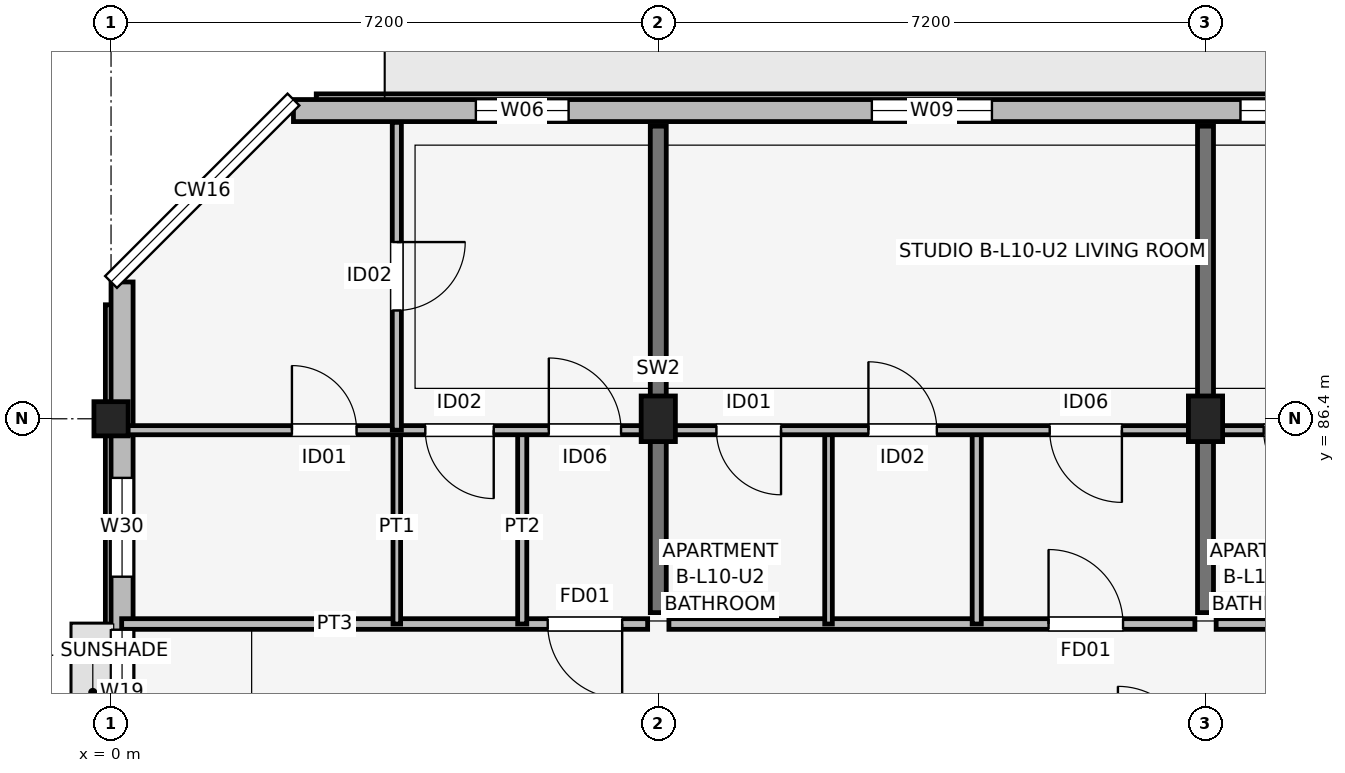
"""IFC4 building model, lengths in metres.
Left out: names, types, materials, properties, quantities, classifications, styles, units other than length and angle.
Written with IfcOpenShell. Run it as: python <this file> out.ifc"""

import sys

from ifc_helpers import new_model, si_unit, direction, frame, frame_2d, origin, origin_2d, place, context, subcontext, project, spatial, rectangle, extrude, element, fill, save


model = new_model("IFC4")
c1 = context("Model", 3, precision=1e-05, world=origin(), true_north=direction((0.0, 1.0)))
c2 = subcontext(c1, "Body", "Model", "MODEL_VIEW")
j1 = project(units=[si_unit("LENGTHUNIT", "METRE"), si_unit("PLANEANGLEUNIT", "RADIAN")], contexts=[c1])
p1 = place(None, origin())
s1 = spatial("IfcSite", under=j1, at=p1, CompositionType="ELEMENT")
p2 = place(p1, origin())
s2 = spatial("IfcBuilding", under=s1, at=p2, CompositionType="ELEMENT")
p3 = place(p2, frame((0.0, 0.0, 33.9)))
s3 = spatial("IfcBuildingStorey", under=s2, at=p3, CompositionType="ELEMENT", Elevation=33.9)
p4 = place(p3, frame((0.0, 86.4, 0.0), z_axis=(0.0, 0.0, 1.0), x_axis=(1.0, 0.0, 0.0)))
e1 = element("IfcColumn", 1, at=p4, inside=s3, PredefinedType="COLUMN", context=c2, shape_type="SweptSolid", body=[
    extrude(rectangle(XDim=0.45, YDim=0.45, at=origin_2d()), origin(), (0.0, 0.0, 1.0), 3.15),
])
for number, where, z_axis, x_axis in (
    (2, (7.2, 86.4, 0.0), (0.0, 0.0, 1.0), (1.0, 0.0, 0.0)),
    (3, (14.4, 86.4, 0.0), (0.0, 0.0, 1.0), (1.0, 0.0, 0.0)),
):
    element("IfcColumn", number, at=place(p3, frame(where, z_axis=z_axis, x_axis=x_axis)), inside=s3, PredefinedType="COLUMN", context=c2, shape_type="SweptSolid", body=[
        extrude(rectangle(XDim=0.45, YDim=0.6, at=origin_2d()), origin(), (0.0, 0.0, 1.0), 3.15),
    ])
for number, where, z_axis, x_axis in (
    (4, (7.2, 83.85, 0.0), (0.0, 0.0, 1.0), (0.0, 1.0, 0.0)),
    (5, (14.4, 83.85, 0.0), (0.0, 0.0, 1.0), (0.0, 1.0, 0.0)),
):
    element("IfcWall", number, at=place(p3, frame(where, z_axis=z_axis, x_axis=x_axis)), inside=s3, PredefinedType="SHEAR", context=c2, shape_type="SweptSolid", body=[
        extrude(rectangle(XDim=6.4, YDim=0.21, at=frame_2d((3.2, 0.0))), origin(), (0.0, 0.0, 1.0), 3.15),
    ])
p5 = place(p3, frame((33.6, 90.455, 0.0), z_axis=(0.0, 0.0, 1.0), x_axis=(-1.0, 0.0, 0.0)))
e6 = element("IfcWall", 6, at=p5, inside=s3, PredefinedType="SOLIDWALL", context=c2, shape_type="SweptSolid", body=[
    extrude(rectangle(XDim=31.2, YDim=0.29, at=frame_2d((15.6, 0.0))), origin(), (0.0, 0.0, 1.0), 2.48),
])
p6 = place(p5, frame((14.95, 0.0, 0.0), z_axis=(0.0, 0.0, 1.0), x_axis=(-1.0, 0.0, 0.0)))
e7 = element("IfcOpeningElement", 7, at=p6, cuts=e6, PredefinedType="OPENING", context=c2, shape_type="SweptSolid", body=[
    extrude(rectangle(XDim=1.9, YDim=2.2, at=frame_2d((0.95, 1.1))), frame((0.0, 0.155, 0.0), z_axis=(0.0, -1.0, 0.0), x_axis=(1.0, 0.0, 0.0)), (0.0, 0.0, 1.0), 0.31),
])
p7 = place(p5, frame((27.58, 0.0, 0.75)))
e8 = element("IfcOpeningElement", 8, at=p7, cuts=e6, PredefinedType="OPENING", context=c2, shape_type="SweptSolid", body=[
    extrude(rectangle(XDim=1.22, YDim=1.5, at=frame_2d((0.61, 0.75))), frame((0.0, 0.155, 0.0), z_axis=(0.0, -1.0, 0.0), x_axis=(1.0, 0.0, 0.0)), (0.0, 0.0, 1.0), 0.31),
])
p8 = place(p5, frame((22.01, 0.0, 0.7)))
e9 = element("IfcOpeningElement", 9, at=p8, cuts=e6, PredefinedType="OPENING", context=c2, shape_type="SweptSolid", body=[
    extrude(rectangle(XDim=1.58, YDim=1.6, at=frame_2d((0.79, 0.8))), frame((0.0, 0.155, 0.0), z_axis=(0.0, -1.0, 0.0), x_axis=(1.0, 0.0, 0.0)), (0.0, 0.0, 1.0), 0.31),
])
p9 = place(p5, frame((17.28, 0.0, 0.75)))
e10 = element("IfcOpeningElement", 10, at=p9, cuts=e6, PredefinedType="OPENING", context=c2, shape_type="SweptSolid", body=[
    extrude(rectangle(XDim=1.46, YDim=1.55, at=frame_2d((0.73, 0.775))), frame((0.0, 0.155, 0.0), z_axis=(0.0, -1.0, 0.0), x_axis=(1.0, 0.0, 0.0)), (0.0, 0.0, 1.0), 0.31),
])
p10 = place(p5, frame((7.47, 0.0, 0.7)))
e11 = element("IfcOpeningElement", 11, at=p10, cuts=e6, PredefinedType="OPENING", context=c2, shape_type="SweptSolid", body=[
    extrude(rectangle(XDim=1.86, YDim=1.6, at=frame_2d((0.93, 0.8))), frame((0.0, 0.155, 0.0), z_axis=(0.0, -1.0, 0.0), x_axis=(1.0, 0.0, 0.0)), (0.0, 0.0, 1.0), 0.31),
])
p11 = place(p5, frame((1.41, 0.0, 0.7)))
e12 = element("IfcOpeningElement", 12, at=p11, cuts=e6, PredefinedType="OPENING", context=c2, shape_type="SweptSolid", body=[
    extrude(rectangle(XDim=2.0, YDim=1.65, at=frame_2d((1.0, 0.825))), frame((0.0, 0.155, 0.0), z_axis=(0.0, -1.0, 0.0), x_axis=(1.0, 0.0, 0.0)), (0.0, 0.0, 1.0), 0.31),
])
p12 = place(p3, frame((0.145, 88.2, 0.0), z_axis=(0.0, 0.0, 1.0), x_axis=(0.0, -1.0, 0.0)))
e13 = element("IfcWall", 13, at=p12, inside=s3, PredefinedType="SOLIDWALL", context=c2, shape_type="SweptSolid", body=[
    extrude(rectangle(XDim=13.8, YDim=0.29, at=frame_2d((6.9, 0.0))), origin(), (0.0, 0.0, 1.0), 2.48),
])
p13 = place(p12, frame((4.575, 0.0, 1.05)))
e14 = element("IfcOpeningElement", 14, at=p13, cuts=e13, PredefinedType="OPENING", context=c2, shape_type="SweptSolid", body=[
    extrude(rectangle(XDim=1.65, YDim=1.15, at=frame_2d((0.825, 0.575))), frame((0.0, 0.155, 0.0), z_axis=(0.0, -1.0, 0.0), x_axis=(1.0, 0.0, 0.0)), (0.0, 0.0, 1.0), 0.31),
])
p14 = place(p12, frame((2.577, 0.0, 0.75)))
e15 = element("IfcOpeningElement", 15, at=p14, cuts=e13, PredefinedType="OPENING", context=c2, shape_type="SweptSolid", body=[
    extrude(rectangle(XDim=1.3, YDim=1.55, at=frame_2d((0.65, 0.775))), frame((0.0, 0.155, 0.0), z_axis=(0.0, -1.0, 0.0), x_axis=(1.0, 0.0, 0.0)), (0.0, 0.0, 1.0), 0.31),
])
p15 = place(p3, frame((0.14, 83.7, 0.0), z_axis=(0.0, 0.0, 1.0), x_axis=(1.0, 0.0, 0.0)))
e16 = element("IfcWall", 16, at=p15, inside=s3, PredefinedType="PARTITIONING", context=c2, shape_type="SweptSolid", body=[
    extrude(rectangle(XDim=6.92, YDim=0.14, at=frame_2d((3.46, 0.0))), origin(), (0.0, 0.0, 1.0), 2.38),
])
p16 = place(p15, frame((6.585, 0.0, 0.0), z_axis=(0.0, 0.0, 1.0), x_axis=(-1.0, 0.0, 0.0)))
e17 = element("IfcOpeningElement", 17, at=p16, cuts=e16, PredefinedType="OPENING", context=c2, shape_type="SweptSolid", body=[
    extrude(rectangle(XDim=0.98, YDim=2.1, at=frame_2d((0.49, 1.05))), frame((0.0, 0.08, 0.0), z_axis=(0.0, -1.0, 0.0), x_axis=(1.0, 0.0, 0.0)), (0.0, 0.0, 1.0), 0.16),
])
p17 = place(p3, frame((3.76, 83.7, 0.0), z_axis=(0.0, 0.0, 1.0), x_axis=(0.0, 1.0, 0.0)))
e18 = element("IfcWall", 18, at=p17, inside=s3, PredefinedType="PARTITIONING", context=c2, shape_type="SweptSolid", body=[
    extrude(rectangle(XDim=2.55, YDim=0.1, at=frame_2d((1.275, 0.0))), origin(), (0.0, 0.0, 1.0), 2.38),
])
p18 = place(p3, frame((5.41, 83.7, 0.0), z_axis=(0.0, 0.0, 1.0), x_axis=(0.0, 1.0, 0.0)))
e19 = element("IfcWall", 19, at=p18, inside=s3, PredefinedType="PARTITIONING", context=c2, shape_type="SweptSolid", body=[
    extrude(rectangle(XDim=2.55, YDim=0.12, at=frame_2d((1.275, 0.0))), origin(), (0.0, 0.0, 1.0), 2.38),
])
p19 = place(p3, frame((0.14, 86.25, 0.0), z_axis=(0.0, 0.0, 1.0), x_axis=(1.0, 0.0, 0.0)))
e20 = element("IfcWall", 20, at=p19, inside=s3, PredefinedType="PARTITIONING", context=c2, shape_type="SweptSolid", body=[
    extrude(rectangle(XDim=6.92, YDim=0.12, at=frame_2d((3.46, 0.0))), origin(), (0.0, 0.0, 1.0), 2.38),
])
p20 = place(p19, frame((2.24, 0.0, 0.0)))
e21 = element("IfcOpeningElement", 21, at=p20, cuts=e20, PredefinedType="OPENING", context=c2, shape_type="SweptSolid", body=[
    extrude(rectangle(XDim=0.85, YDim=2.08, at=frame_2d((0.425, 1.04))), frame((0.0, 0.07, 0.0), z_axis=(0.0, -1.0, 0.0), x_axis=(1.0, 0.0, 0.0)), (0.0, 0.0, 1.0), 0.14),
])
p21 = place(p19, frame((4.895, 0.0, 0.0), z_axis=(0.0, 0.0, 1.0), x_axis=(-1.0, 0.0, 0.0)))
e22 = element("IfcOpeningElement", 22, at=p21, cuts=e20, PredefinedType="OPENING", context=c2, shape_type="SweptSolid", body=[
    extrude(rectangle(XDim=0.9, YDim=2.08, at=frame_2d((0.45, 1.04))), frame((0.0, 0.07, 0.0), z_axis=(0.0, -1.0, 0.0), x_axis=(1.0, 0.0, 0.0)), (0.0, 0.0, 1.0), 0.14),
])
p22 = place(p19, frame((5.62, 0.0, 0.0)))
e23 = element("IfcOpeningElement", 23, at=p22, cuts=e20, PredefinedType="OPENING", context=c2, shape_type="SweptSolid", body=[
    extrude(rectangle(XDim=0.95, YDim=2.08, at=frame_2d((0.475, 1.04))), frame((0.0, 0.07, 0.0), z_axis=(0.0, -1.0, 0.0), x_axis=(1.0, 0.0, 0.0)), (0.0, 0.0, 1.0), 0.14),
])
p23 = place(p3, frame((3.76, 86.25, 0.0), z_axis=(0.0, 0.0, 1.0), x_axis=(0.0, 1.0, 0.0)))
e24 = element("IfcWall", 24, at=p23, inside=s3, PredefinedType="PARTITIONING", context=c2, shape_type="SweptSolid", body=[
    extrude(rectangle(XDim=4.05, YDim=0.12, at=frame_2d((2.025, 0.0))), origin(), (0.0, 0.0, 1.0), 2.38),
])
p24 = place(p23, frame((2.475, 0.0, 0.0), z_axis=(0.0, 0.0, 1.0), x_axis=(-1.0, 0.0, 0.0)))
e25 = element("IfcOpeningElement", 25, at=p24, cuts=e24, PredefinedType="OPENING", context=c2, shape_type="SweptSolid", body=[
    extrude(rectangle(XDim=0.9, YDim=2.08, at=frame_2d((0.45, 1.04))), frame((0.0, 0.07, 0.0), z_axis=(0.0, -1.0, 0.0), x_axis=(1.0, 0.0, 0.0)), (0.0, 0.0, 1.0), 0.14),
])
p25 = place(p3, frame((7.34, 83.7, 0.0), z_axis=(0.0, 0.0, 1.0), x_axis=(1.0, 0.0, 0.0)))
e26 = element("IfcWall", 26, at=p25, inside=s3, PredefinedType="PARTITIONING", context=c2, shape_type="SweptSolid", body=[
    extrude(rectangle(XDim=6.92, YDim=0.14, at=frame_2d((3.46, 0.0))), origin(), (0.0, 0.0, 1.0), 2.38),
])
p26 = place(p25, frame((4.995, 0.0, 0.0)))
e27 = element("IfcOpeningElement", 27, at=p26, cuts=e26, PredefinedType="OPENING", context=c2, shape_type="SweptSolid", body=[
    extrude(rectangle(XDim=0.98, YDim=2.1, at=frame_2d((0.49, 1.05))), frame((0.0, 0.08, 0.0), z_axis=(0.0, -1.0, 0.0), x_axis=(1.0, 0.0, 0.0)), (0.0, 0.0, 1.0), 0.16),
])
p27 = place(p3, frame((9.44, 83.7, 0.0), z_axis=(0.0, 0.0, 1.0), x_axis=(0.0, 1.0, 0.0)))
e28 = element("IfcWall", 28, at=p27, inside=s3, PredefinedType="PARTITIONING", context=c2, shape_type="SweptSolid", body=[
    extrude(rectangle(XDim=2.55, YDim=0.1, at=frame_2d((1.275, 0.0))), origin(), (0.0, 0.0, 1.0), 2.38),
])
p28 = place(p3, frame((11.39, 83.7, 0.0), z_axis=(0.0, 0.0, 1.0), x_axis=(0.0, 1.0, 0.0)))
e29 = element("IfcWall", 29, at=p28, inside=s3, PredefinedType="PARTITIONING", context=c2, shape_type="SweptSolid", body=[
    extrude(rectangle(XDim=2.55, YDim=0.12, at=frame_2d((1.275, 0.0))), origin(), (0.0, 0.0, 1.0), 2.38),
])
p29 = place(p3, frame((7.34, 86.25, 0.0), z_axis=(0.0, 0.0, 1.0), x_axis=(1.0, 0.0, 0.0)))
e30 = element("IfcWall", 30, at=p29, inside=s3, PredefinedType="PARTITIONING", context=c2, shape_type="SweptSolid", body=[
    extrude(rectangle(XDim=6.92, YDim=0.12, at=frame_2d((3.46, 0.0))), origin(), (0.0, 0.0, 1.0), 2.38),
])
p30 = place(p29, frame((1.475, 0.0, 0.0), z_axis=(0.0, 0.0, 1.0), x_axis=(-1.0, 0.0, 0.0)))
e31 = element("IfcOpeningElement", 31, at=p30, cuts=e30, PredefinedType="OPENING", context=c2, shape_type="SweptSolid", body=[
    extrude(rectangle(XDim=0.85, YDim=2.08, at=frame_2d((0.425, 1.04))), frame((0.0, 0.07, 0.0), z_axis=(0.0, -1.0, 0.0), x_axis=(1.0, 0.0, 0.0)), (0.0, 0.0, 1.0), 0.14),
])
p31 = place(p29, frame((2.625, 0.0, 0.0)))
e32 = element("IfcOpeningElement", 32, at=p31, cuts=e30, PredefinedType="OPENING", context=c2, shape_type="SweptSolid", body=[
    extrude(rectangle(XDim=0.9, YDim=2.08, at=frame_2d((0.45, 1.04))), frame((0.0, 0.07, 0.0), z_axis=(0.0, -1.0, 0.0), x_axis=(1.0, 0.0, 0.0)), (0.0, 0.0, 1.0), 0.14),
])
p32 = place(p29, frame((5.96, 0.0, 0.0), z_axis=(0.0, 0.0, 1.0), x_axis=(-1.0, 0.0, 0.0)))
e33 = element("IfcOpeningElement", 33, at=p32, cuts=e30, PredefinedType="OPENING", context=c2, shape_type="SweptSolid", body=[
    extrude(rectangle(XDim=0.95, YDim=2.08, at=frame_2d((0.475, 1.04))), frame((0.0, 0.07, 0.0), z_axis=(0.0, -1.0, 0.0), x_axis=(1.0, 0.0, 0.0)), (0.0, 0.0, 1.0), 0.14),
])
p33 = place(p3, frame((14.54, 83.7, 0.0), z_axis=(0.0, 0.0, 1.0), x_axis=(1.0, 0.0, 0.0)))
e34 = element("IfcWall", 34, at=p33, inside=s3, PredefinedType="PARTITIONING", context=c2, shape_type="SweptSolid", body=[
    extrude(rectangle(XDim=6.92, YDim=0.14, at=frame_2d((3.46, 0.0))), origin(), (0.0, 0.0, 1.0), 2.38),
])
p34 = place(p33, frame((5.145, 0.0, 0.0)))
e35 = element("IfcOpeningElement", 35, at=p34, cuts=e34, PredefinedType="OPENING", context=c2, shape_type="SweptSolid", body=[
    extrude(rectangle(XDim=0.98, YDim=2.1, at=frame_2d((0.49, 1.05))), frame((0.0, 0.08, 0.0), z_axis=(0.0, -1.0, 0.0), x_axis=(1.0, 0.0, 0.0)), (0.0, 0.0, 1.0), 0.16),
])
p35 = place(p3, frame((14.54, 86.25, 0.0), z_axis=(0.0, 0.0, 1.0), x_axis=(1.0, 0.0, 0.0)))
e36 = element("IfcWall", 36, at=p35, inside=s3, PredefinedType="PARTITIONING", context=c2, shape_type="SweptSolid", body=[
    extrude(rectangle(XDim=6.92, YDim=0.12, at=frame_2d((3.46, 0.0))), origin(), (0.0, 0.0, 1.0), 2.38),
])
p36 = place(p35, frame((1.475, 0.0, 0.0), z_axis=(0.0, 0.0, 1.0), x_axis=(-1.0, 0.0, 0.0)))
e37 = element("IfcOpeningElement", 37, at=p36, cuts=e36, PredefinedType="OPENING", context=c2, shape_type="SweptSolid", body=[
    extrude(rectangle(XDim=0.85, YDim=2.08, at=frame_2d((0.425, 1.04))), frame((0.0, 0.07, 0.0), z_axis=(0.0, -1.0, 0.0), x_axis=(1.0, 0.0, 0.0)), (0.0, 0.0, 1.0), 0.14),
])
p37 = place(p35, frame((2.775, 0.0, 0.0)))
e38 = element("IfcOpeningElement", 38, at=p37, cuts=e36, PredefinedType="OPENING", context=c2, shape_type="SweptSolid", body=[
    extrude(rectangle(XDim=0.9, YDim=2.08, at=frame_2d((0.45, 1.04))), frame((0.0, 0.07, 0.0), z_axis=(0.0, -1.0, 0.0), x_axis=(1.0, 0.0, 0.0)), (0.0, 0.0, 1.0), 0.14),
])
p38 = place(p35, frame((6.11, 0.0, 0.0), z_axis=(0.0, 0.0, 1.0), x_axis=(-1.0, 0.0, 0.0)))
e39 = element("IfcOpeningElement", 39, at=p38, cuts=e36, PredefinedType="OPENING", context=c2, shape_type="SweptSolid", body=[
    extrude(rectangle(XDim=0.95, YDim=2.08, at=frame_2d((0.475, 1.04))), frame((0.0, 0.07, 0.0), z_axis=(0.0, -1.0, 0.0), x_axis=(1.0, 0.0, 0.0)), (0.0, 0.0, 1.0), 0.14),
])
p39 = place(p7, origin())
e40 = element("IfcWindow", 40, at=p39, inside=s3, PartitioningType="SINGLE_PANEL", PredefinedType="WINDOW", context=c2, shape_type="SweptSolid", body=[
    extrude(rectangle(XDim=1.22, YDim=1.5, at=frame_2d((0.61, 0.75))), frame((0.0, 0.03, 0.0), z_axis=(0.0, -1.0, 0.0), x_axis=(1.0, 0.0, 0.0)), (0.0, 0.0, 1.0), 0.06),
])
fill(e8, e40)
p40 = place(p8, origin())
e41 = element("IfcWindow", 41, at=p40, inside=s3, PartitioningType="SINGLE_PANEL", PredefinedType="WINDOW", context=c2, shape_type="SweptSolid", body=[
    extrude(rectangle(XDim=1.58, YDim=1.6, at=frame_2d((0.79, 0.8))), frame((0.0, 0.03, 0.0), z_axis=(0.0, -1.0, 0.0), x_axis=(1.0, 0.0, 0.0)), (0.0, 0.0, 1.0), 0.06),
])
fill(e9, e41)
p41 = place(p9, origin())
e42 = element("IfcWindow", 42, at=p41, inside=s3, PartitioningType="SINGLE_PANEL", PredefinedType="WINDOW", context=c2, shape_type="SweptSolid", body=[
    extrude(rectangle(XDim=1.46, YDim=1.55, at=frame_2d((0.73, 0.775))), frame((0.0, 0.03, 0.0), z_axis=(0.0, -1.0, 0.0), x_axis=(1.0, 0.0, 0.0)), (0.0, 0.0, 1.0), 0.06),
])
fill(e10, e42)
p42 = place(p13, origin())
e43 = element("IfcWindow", 43, at=p42, inside=s3, PartitioningType="SINGLE_PANEL", PredefinedType="WINDOW", context=c2, shape_type="SweptSolid", body=[
    extrude(rectangle(XDim=1.65, YDim=1.15, at=frame_2d((0.825, 0.575))), frame((0.0, 0.03, 0.0), z_axis=(0.0, -1.0, 0.0), x_axis=(1.0, 0.0, 0.0)), (0.0, 0.0, 1.0), 0.06),
])
fill(e14, e43)
p43 = place(p14, origin())
e44 = element("IfcWindow", 44, at=p43, inside=s3, PartitioningType="SINGLE_PANEL", PredefinedType="WINDOW", context=c2, shape_type="SweptSolid", body=[
    extrude(rectangle(XDim=1.3, YDim=1.55, at=frame_2d((0.65, 0.775))), frame((0.0, 0.03, 0.0), z_axis=(0.0, -1.0, 0.0), x_axis=(1.0, 0.0, 0.0)), (0.0, 0.0, 1.0), 0.06),
])
fill(e15, e44)
p44 = place(p16, origin())
e45 = element("IfcDoor", 45, at=p44, inside=s3, OperationType="SINGLE_SWING_RIGHT", PredefinedType="DOOR", context=c2, shape_type="SweptSolid", body=[
    extrude(rectangle(XDim=0.98, YDim=2.1, at=frame_2d((0.49, 1.05))), frame((0.0, 0.025, 0.0), z_axis=(0.0, -1.0, 0.0), x_axis=(1.0, 0.0, 0.0)), (0.0, 0.0, 1.0), 0.05),
])
fill(e17, e45)
p45 = place(p20, origin())
e46 = element("IfcDoor", 46, at=p45, inside=s3, OperationType="SINGLE_SWING_LEFT", PredefinedType="DOOR", context=c2, shape_type="SweptSolid", body=[
    extrude(rectangle(XDim=0.85, YDim=2.08, at=frame_2d((0.425, 1.04))), frame((0.0, 0.025, 0.0), z_axis=(0.0, -1.0, 0.0), x_axis=(1.0, 0.0, 0.0)), (0.0, 0.0, 1.0), 0.05),
])
fill(e21, e46)
p46 = place(p21, origin())
e47 = element("IfcDoor", 47, at=p46, inside=s3, OperationType="SINGLE_SWING_RIGHT", PredefinedType="DOOR", context=c2, shape_type="SweptSolid", body=[
    extrude(rectangle(XDim=0.9, YDim=2.08, at=frame_2d((0.45, 1.04))), frame((0.0, 0.025, 0.0), z_axis=(0.0, -1.0, 0.0), x_axis=(1.0, 0.0, 0.0)), (0.0, 0.0, 1.0), 0.05),
])
fill(e22, e47)
p47 = place(p22, origin())
e48 = element("IfcDoor", 48, at=p47, inside=s3, OperationType="SINGLE_SWING_LEFT", PredefinedType="DOOR", context=c2, shape_type="SweptSolid", body=[
    extrude(rectangle(XDim=0.95, YDim=2.08, at=frame_2d((0.475, 1.04))), frame((0.0, 0.025, 0.0), z_axis=(0.0, -1.0, 0.0), x_axis=(1.0, 0.0, 0.0)), (0.0, 0.0, 1.0), 0.05),
])
fill(e23, e48)
p48 = place(p24, origin())
e49 = element("IfcDoor", 49, at=p48, inside=s3, OperationType="SINGLE_SWING_RIGHT", PredefinedType="DOOR", context=c2, shape_type="SweptSolid", body=[
    extrude(rectangle(XDim=0.9, YDim=2.08, at=frame_2d((0.45, 1.04))), frame((0.0, 0.025, 0.0), z_axis=(0.0, -1.0, 0.0), x_axis=(1.0, 0.0, 0.0)), (0.0, 0.0, 1.0), 0.05),
])
fill(e25, e49)
p49 = place(p26, origin())
e50 = element("IfcDoor", 50, at=p49, inside=s3, OperationType="SINGLE_SWING_LEFT", PredefinedType="DOOR", context=c2, shape_type="SweptSolid", body=[
    extrude(rectangle(XDim=0.98, YDim=2.1, at=frame_2d((0.49, 1.05))), frame((0.0, 0.025, 0.0), z_axis=(0.0, -1.0, 0.0), x_axis=(1.0, 0.0, 0.0)), (0.0, 0.0, 1.0), 0.05),
])
fill(e27, e50)
p50 = place(p30, origin())
e51 = element("IfcDoor", 51, at=p50, inside=s3, OperationType="SINGLE_SWING_RIGHT", PredefinedType="DOOR", context=c2, shape_type="SweptSolid", body=[
    extrude(rectangle(XDim=0.85, YDim=2.08, at=frame_2d((0.425, 1.04))), frame((0.0, 0.025, 0.0), z_axis=(0.0, -1.0, 0.0), x_axis=(1.0, 0.0, 0.0)), (0.0, 0.0, 1.0), 0.05),
])
fill(e31, e51)
p51 = place(p31, origin())
e52 = element("IfcDoor", 52, at=p51, inside=s3, OperationType="SINGLE_SWING_LEFT", PredefinedType="DOOR", context=c2, shape_type="SweptSolid", body=[
    extrude(rectangle(XDim=0.9, YDim=2.08, at=frame_2d((0.45, 1.04))), frame((0.0, 0.025, 0.0), z_axis=(0.0, -1.0, 0.0), x_axis=(1.0, 0.0, 0.0)), (0.0, 0.0, 1.0), 0.05),
])
fill(e32, e52)
p52 = place(p32, origin())
e53 = element("IfcDoor", 53, at=p52, inside=s3, OperationType="SINGLE_SWING_RIGHT", PredefinedType="DOOR", context=c2, shape_type="SweptSolid", body=[
    extrude(rectangle(XDim=0.95, YDim=2.08, at=frame_2d((0.475, 1.04))), frame((0.0, 0.025, 0.0), z_axis=(0.0, -1.0, 0.0), x_axis=(1.0, 0.0, 0.0)), (0.0, 0.0, 1.0), 0.05),
])
fill(e33, e53)
p53 = place(p36, origin())
e54 = element("IfcDoor", 54, at=p53, inside=s3, OperationType="SINGLE_SWING_RIGHT", PredefinedType="DOOR", context=c2, shape_type="SweptSolid", body=[
    extrude(rectangle(XDim=0.85, YDim=2.08, at=frame_2d((0.425, 1.04))), frame((0.0, 0.025, 0.0), z_axis=(0.0, -1.0, 0.0), x_axis=(1.0, 0.0, 0.0)), (0.0, 0.0, 1.0), 0.05),
])
fill(e37, e54)
save(model, sys.argv[1])
